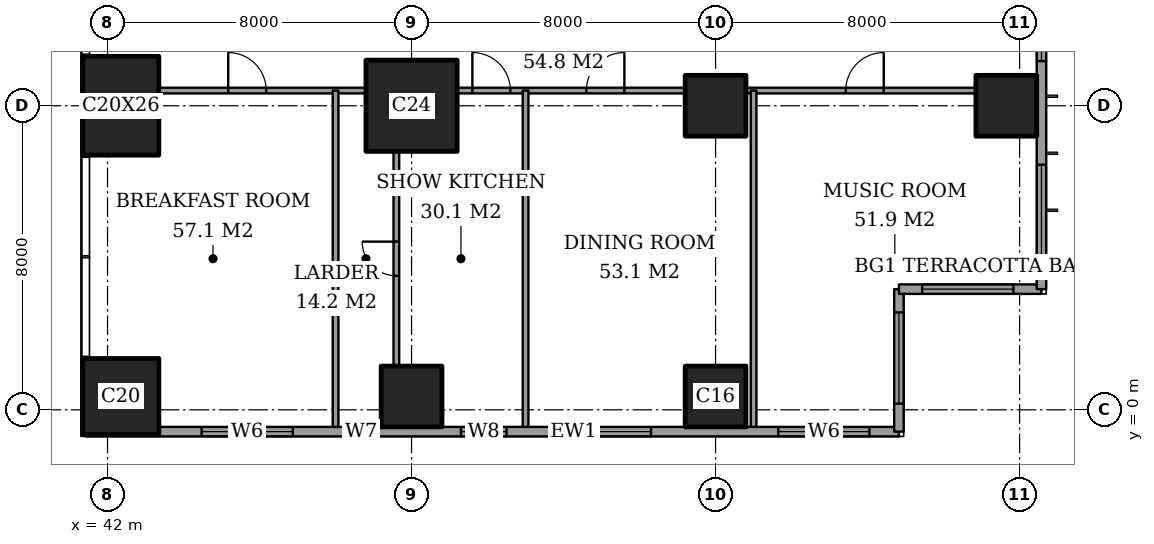
"""IFC4 building model, lengths in metres.
Left out: names, types, materials, properties, quantities, classifications, styles, units other than length and angle.
Written with IfcOpenShell. Run it as: python <this file> out.ifc"""

import sys

from ifc_helpers import new_model, si_unit, direction, frame, frame_2d, origin, origin_2d, place, context, subcontext, project, spatial, rectangle, extrude, element, fill, save


model = new_model("IFC4")
c1 = context("Model", 3, precision=1e-05, world=origin(), true_north=direction((0.0, 1.0)))
c2 = subcontext(c1, "Body", "Model", "MODEL_VIEW")
j1 = project(units=[si_unit("LENGTHUNIT", "METRE"), si_unit("PLANEANGLEUNIT", "RADIAN")], contexts=[c1])
p1 = place(None, origin())
s1 = spatial("IfcSite", under=j1, at=p1, CompositionType="ELEMENT")
p2 = place(p1, origin())
s2 = spatial("IfcBuilding", under=s1, at=p2, CompositionType="ELEMENT")
p3 = place(p2, frame((0.0, 0.0, 244.8)))
s3 = spatial("IfcBuildingStorey", under=s2, at=p3, CompositionType="ELEMENT", Elevation=244.8)
p4 = place(p3, frame((42.35, 0.35, 0.0), z_axis=(0.0, 0.0, 1.0), x_axis=(1.0, 0.0, 0.0)))
e1 = element("IfcColumn", 1, at=p4, inside=s3, PredefinedType="COLUMN", context=c2, shape_type="SweptSolid", body=[
    extrude(rectangle(XDim=2.0, YDim=2.0, at=origin_2d()), origin(), (0.0, 0.0, 1.0), 3.6),
])
p5 = place(p3, frame((42.35, 8.0, 0.0), z_axis=(0.0, 0.0, 1.0), x_axis=(1.0, 0.0, 0.0)))
e2 = element("IfcColumn", 2, at=p5, inside=s3, PredefinedType="COLUMN", context=c2, shape_type="SweptSolid", body=[
    extrude(rectangle(XDim=2.0, YDim=2.6, at=origin_2d()), origin(), (0.0, 0.0, 1.0), 3.6),
])
p6 = place(p3, frame((50.0, 0.35, 0.0), z_axis=(0.0, 0.0, 1.0), x_axis=(1.0, 0.0, 0.0)))
e3 = element("IfcColumn", 3, at=p6, inside=s3, PredefinedType="COLUMN", context=c2, shape_type="SweptSolid", body=[
    extrude(rectangle(XDim=1.6, YDim=1.6, at=origin_2d()), origin(), (0.0, 0.0, 1.0), 3.6),
])
p7 = place(p3, frame((50.0, 8.0, 0.0), z_axis=(0.0, 0.0, 1.0), x_axis=(1.0, 0.0, 0.0)))
e4 = element("IfcColumn", 4, at=p7, inside=s3, PredefinedType="COLUMN", context=c2, shape_type="SweptSolid", body=[
    extrude(rectangle(XDim=2.4, YDim=2.4, at=origin_2d()), origin(), (0.0, 0.0, 1.0), 3.6),
])
for number, where, z_axis, x_axis in (
    (5, (58.0, 0.35, 0.0), (0.0, 0.0, 1.0), (1.0, 0.0, 0.0)),
    (6, (58.0, 8.0, 0.0), (0.0, 0.0, 1.0), (1.0, 0.0, 0.0)),
    (7, (65.65, 8.0, 0.0), (0.0, 0.0, 1.0), (1.0, 0.0, 0.0)),
):
    element("IfcColumn", number, at=place(p3, frame(where, z_axis=z_axis, x_axis=x_axis)), inside=s3, PredefinedType="COLUMN", context=c2, shape_type="SweptSolid", body=[
        extrude(rectangle(XDim=1.6, YDim=1.6, at=origin_2d()), origin(), (0.0, 0.0, 1.0), 3.6),
    ])
p8 = place(p3, frame((41.425, -0.575, 0.0), z_axis=(0.0, 0.0, 1.0), x_axis=(1.0, 0.0, 0.0)))
e8 = element("IfcWall", 8, at=p8, inside=s3, PredefinedType="SOLIDWALL", context=c2, shape_type="SweptSolid", body=[
    extrude(rectangle(XDim=21.4, YDim=0.25, at=frame_2d((10.7, 0.0))), origin(), (0.0, 0.0, 1.0), 3.6),
])
p9 = place(p8, frame((3.05, 0.0, 0.6)))
e9 = element("IfcOpeningElement", 9, at=p9, cuts=e8, PredefinedType="OPENING", context=c2, shape_type="SweptSolid", body=[
    extrude(rectangle(XDim=2.4, YDim=2.0, at=frame_2d((1.2, 1.0))), frame((0.0, 0.135, 0.0), z_axis=(0.0, -1.0, 0.0), x_axis=(1.0, 0.0, 0.0)), (0.0, 0.0, 1.0), 0.27),
])
p10 = place(p8, frame((6.95, 0.0, 0.6)))
e10 = element("IfcOpeningElement", 10, at=p10, cuts=e8, PredefinedType="OPENING", context=c2, shape_type="SweptSolid", body=[
    extrude(rectangle(XDim=0.6, YDim=2.0, at=frame_2d((0.3, 1.0))), frame((0.0, 0.135, 0.0), z_axis=(0.0, -1.0, 0.0), x_axis=(1.0, 0.0, 0.0)), (0.0, 0.0, 1.0), 0.27),
])
p11 = place(p8, frame((9.875, 0.0, 0.6)))
e11 = element("IfcOpeningElement", 11, at=p11, cuts=e8, PredefinedType="OPENING", context=c2, shape_type="SweptSolid", body=[
    extrude(rectangle(XDim=1.2, YDim=2.0, at=frame_2d((0.6, 1.0))), frame((0.0, 0.135, 0.0), z_axis=(0.0, -1.0, 0.0), x_axis=(1.0, 0.0, 0.0)), (0.0, 0.0, 1.0), 0.27),
])
p12 = place(p8, frame((12.475, 0.0, 0.6)))
e12 = element("IfcOpeningElement", 12, at=p12, cuts=e8, PredefinedType="OPENING", context=c2, shape_type="SweptSolid", body=[
    extrude(rectangle(XDim=2.4, YDim=2.0, at=frame_2d((1.2, 1.0))), frame((0.0, 0.135, 0.0), z_axis=(0.0, -1.0, 0.0), x_axis=(1.0, 0.0, 0.0)), (0.0, 0.0, 1.0), 0.27),
])
p13 = place(p8, frame((18.225, 0.0, 0.6)))
e13 = element("IfcOpeningElement", 13, at=p13, cuts=e8, PredefinedType="OPENING", context=c2, shape_type="SweptSolid", body=[
    extrude(rectangle(XDim=2.4, YDim=2.0, at=frame_2d((1.2, 1.0))), frame((0.0, 0.135, 0.0), z_axis=(0.0, -1.0, 0.0), x_axis=(1.0, 0.0, 0.0)), (0.0, 0.0, 1.0), 0.27),
])
p14 = place(p3, frame((62.825, -0.575, 0.0), z_axis=(0.0, 0.0, 1.0), x_axis=(0.0, 1.0, 0.0)))
e14 = element("IfcWall", 14, at=p14, inside=s3, PredefinedType="SOLIDWALL", context=c2, shape_type="SweptSolid", body=[
    extrude(rectangle(XDim=3.75, YDim=0.25, at=frame_2d((1.875, 0.0))), origin(), (0.0, 0.0, 1.0), 3.6),
])
p15 = place(p14, frame((0.738, 0.0, 0.6)))
e15 = element("IfcOpeningElement", 15, at=p15, cuts=e14, PredefinedType="OPENING", context=c2, shape_type="SweptSolid", body=[
    extrude(rectangle(XDim=2.4, YDim=2.0, at=frame_2d((1.2, 1.0))), frame((0.0, 0.135, 0.0), z_axis=(0.0, -1.0, 0.0), x_axis=(1.0, 0.0, 0.0)), (0.0, 0.0, 1.0), 0.27),
])
p16 = place(p3, frame((62.825, 3.175, 0.0), z_axis=(0.0, 0.0, 1.0), x_axis=(1.0, 0.0, 0.0)))
e16 = element("IfcWall", 16, at=p16, inside=s3, PredefinedType="SOLIDWALL", context=c2, shape_type="SweptSolid", body=[
    extrude(rectangle(XDim=3.75, YDim=0.25, at=frame_2d((1.875, 0.0))), origin(), (0.0, 0.0, 1.0), 3.6),
])
p17 = place(p16, frame((0.613, 0.0, 0.6)))
e17 = element("IfcOpeningElement", 17, at=p17, cuts=e16, PredefinedType="OPENING", context=c2, shape_type="SweptSolid", body=[
    extrude(rectangle(XDim=2.4, YDim=2.0, at=frame_2d((1.2, 1.0))), frame((0.0, 0.135, 0.0), z_axis=(0.0, -1.0, 0.0), x_axis=(1.0, 0.0, 0.0)), (0.0, 0.0, 1.0), 0.27),
])
p18 = place(p3, frame((66.575, 3.175, 0.0), z_axis=(0.0, 0.0, 1.0), x_axis=(0.0, 1.0, 0.0)))
e18 = element("IfcWall", 18, at=p18, inside=s3, PredefinedType="SOLIDWALL", context=c2, shape_type="SweptSolid", body=[
    extrude(rectangle(XDim=41.65, YDim=0.25, at=frame_2d((20.825, 0.0))), origin(), (0.0, 0.0, 1.0), 3.6),
])
p19 = place(p18, frame((0.875, 0.0, 0.6)))
e19 = element("IfcOpeningElement", 19, at=p19, cuts=e18, PredefinedType="OPENING", context=c2, shape_type="SweptSolid", body=[
    extrude(rectangle(XDim=2.4, YDim=2.0, at=frame_2d((1.2, 1.0))), frame((0.0, 0.135, 0.0), z_axis=(0.0, -1.0, 0.0), x_axis=(1.0, 0.0, 0.0)), (0.0, 0.0, 1.0), 0.27),
])
p20 = place(p18, frame((6.0, 0.0, 0.6)))
e20 = element("IfcOpeningElement", 20, at=p20, cuts=e18, PredefinedType="OPENING", context=c2, shape_type="SweptSolid", body=[
    extrude(rectangle(XDim=1.2, YDim=2.0, at=frame_2d((0.6, 1.0))), frame((0.0, 0.135, 0.0), z_axis=(0.0, -1.0, 0.0), x_axis=(1.0, 0.0, 0.0)), (0.0, 0.0, 1.0), 0.27),
])
p21 = place(p18, frame((8.525, 0.0, 0.6)))
e21 = element("IfcOpeningElement", 21, at=p21, cuts=e18, PredefinedType="OPENING", context=c2, shape_type="SweptSolid", body=[
    extrude(rectangle(XDim=2.4, YDim=2.0, at=frame_2d((1.2, 1.0))), frame((0.0, 0.135, 0.0), z_axis=(0.0, -1.0, 0.0), x_axis=(1.0, 0.0, 0.0)), (0.0, 0.0, 1.0), 0.27),
])
p22 = place(p18, frame((15.725, 0.0, 0.6)))
e22 = element("IfcOpeningElement", 22, at=p22, cuts=e18, PredefinedType="OPENING", context=c2, shape_type="SweptSolid", body=[
    extrude(rectangle(XDim=2.4, YDim=2.0, at=frame_2d((1.2, 1.0))), frame((0.0, 0.135, 0.0), z_axis=(0.0, -1.0, 0.0), x_axis=(1.0, 0.0, 0.0)), (0.0, 0.0, 1.0), 0.27),
])
p23 = place(p18, frame((23.525, 0.0, 0.6)))
e23 = element("IfcOpeningElement", 23, at=p23, cuts=e18, PredefinedType="OPENING", context=c2, shape_type="SweptSolid", body=[
    extrude(rectangle(XDim=2.4, YDim=2.0, at=frame_2d((1.2, 1.0))), frame((0.0, 0.135, 0.0), z_axis=(0.0, -1.0, 0.0), x_axis=(1.0, 0.0, 0.0)), (0.0, 0.0, 1.0), 0.27),
])
p24 = place(p18, frame((30.625, 0.0, 0.6)))
e24 = element("IfcOpeningElement", 24, at=p24, cuts=e18, PredefinedType="OPENING", context=c2, shape_type="SweptSolid", body=[
    extrude(rectangle(XDim=2.4, YDim=2.0, at=frame_2d((1.2, 1.0))), frame((0.0, 0.135, 0.0), z_axis=(0.0, -1.0, 0.0), x_axis=(1.0, 0.0, 0.0)), (0.0, 0.0, 1.0), 0.27),
])
p25 = place(p18, frame((34.325, 0.0, 0.6)))
e25 = element("IfcOpeningElement", 25, at=p25, cuts=e18, PredefinedType="OPENING", context=c2, shape_type="SweptSolid", body=[
    extrude(rectangle(XDim=1.2, YDim=2.0, at=frame_2d((0.6, 1.0))), frame((0.0, 0.135, 0.0), z_axis=(0.0, -1.0, 0.0), x_axis=(1.0, 0.0, 0.0)), (0.0, 0.0, 1.0), 0.27),
])
p26 = place(p18, frame((38.375, 0.0, 0.6)))
e26 = element("IfcOpeningElement", 26, at=p26, cuts=e18, PredefinedType="OPENING", context=c2, shape_type="SweptSolid", body=[
    extrude(rectangle(XDim=2.4, YDim=2.0, at=frame_2d((1.2, 1.0))), frame((0.0, 0.135, 0.0), z_axis=(0.0, -1.0, 0.0), x_axis=(1.0, 0.0, 0.0)), (0.0, 0.0, 1.0), 0.27),
])
p27 = place(p3, frame((43.35, 8.4, 0.0), z_axis=(0.0, 0.0, 1.0), x_axis=(1.0, 0.0, 0.0)))
e27 = element("IfcWall", 27, at=p27, inside=s3, PredefinedType="PARTITIONING", context=c2, shape_type="SweptSolid", body=[
    extrude(rectangle(XDim=5.45, YDim=0.15, at=frame_2d((2.725, 0.0))), origin(), (0.0, 0.0, 1.0), 3.35),
])
p28 = place(p27, frame((1.825, 0.0, 0.0)))
e28 = element("IfcOpeningElement", 28, at=p28, cuts=e27, PredefinedType="OPENING", context=c2, shape_type="SweptSolid", body=[
    extrude(rectangle(XDim=1.0, YDim=2.1, at=frame_2d((0.5, 1.05))), frame((0.0, 0.085, 0.0), z_axis=(0.0, -1.0, 0.0), x_axis=(1.0, 0.0, 0.0)), (0.0, 0.0, 1.0), 0.17),
])
p29 = place(p3, frame((51.2, 8.4, 0.0), z_axis=(0.0, 0.0, 1.0), x_axis=(1.0, 0.0, 0.0)))
e29 = element("IfcWall", 29, at=p29, inside=s3, PredefinedType="PARTITIONING", context=c2, shape_type="SweptSolid", body=[
    extrude(rectangle(XDim=6.0, YDim=0.15, at=frame_2d((3.0, 0.0))), origin(), (0.0, 0.0, 1.0), 3.35),
])
p30 = place(p29, frame((3.4, 0.0, 0.0)))
e30 = element("IfcOpeningElement", 30, at=p30, cuts=e29, PredefinedType="OPENING", context=c2, shape_type="SweptSolid", body=[
    extrude(rectangle(XDim=1.0, YDim=2.1, at=frame_2d((0.5, 1.05))), frame((0.0, 0.085, 0.0), z_axis=(0.0, -1.0, 0.0), x_axis=(1.0, 0.0, 0.0)), (0.0, 0.0, 1.0), 0.17),
])
p31 = place(p29, frame((0.4, 0.0, 0.0)))
e31 = element("IfcOpeningElement", 31, at=p31, cuts=e29, PredefinedType="OPENING", context=c2, shape_type="SweptSolid", body=[
    extrude(rectangle(XDim=1.0, YDim=2.1, at=frame_2d((0.5, 1.05))), frame((0.0, 0.085, 0.0), z_axis=(0.0, -1.0, 0.0), x_axis=(1.0, 0.0, 0.0)), (0.0, 0.0, 1.0), 0.17),
])
p32 = place(p3, frame((58.8, 8.4, 0.0), z_axis=(0.0, 0.0, 1.0), x_axis=(1.0, 0.0, 0.0)))
e32 = element("IfcWall", 32, at=p32, inside=s3, PredefinedType="PARTITIONING", context=c2, shape_type="SweptSolid", body=[
    extrude(rectangle(XDim=6.05, YDim=0.15, at=frame_2d((3.025, 0.0))), origin(), (0.0, 0.0, 1.0), 3.35),
])
p33 = place(p32, frame((2.625, 0.0, 0.0)))
e33 = element("IfcOpeningElement", 33, at=p33, cuts=e32, PredefinedType="OPENING", context=c2, shape_type="SweptSolid", body=[
    extrude(rectangle(XDim=1.0, YDim=2.1, at=frame_2d((0.5, 1.05))), frame((0.0, 0.085, 0.0), z_axis=(0.0, -1.0, 0.0), x_axis=(1.0, 0.0, 0.0)), (0.0, 0.0, 1.0), 0.17),
])
p34 = place(p3, frame((48.0, -0.45, 0.0), z_axis=(0.0, 0.0, 1.0), x_axis=(0.0, 1.0, 0.0)))
e34 = element("IfcWall", 34, at=p34, inside=s3, PredefinedType="PARTITIONING", context=c2, shape_type="SweptSolid", body=[
    extrude(rectangle(XDim=8.85, YDim=0.15, at=frame_2d((4.425, 0.0))), origin(), (0.0, 0.0, 1.0), 3.35),
])
p35 = place(p3, frame((49.6, 1.15, 0.0), z_axis=(0.0, 0.0, 1.0), x_axis=(0.0, 1.0, 0.0)))
e35 = element("IfcWall", 35, at=p35, inside=s3, PredefinedType="PARTITIONING", context=c2, shape_type="SweptSolid", body=[
    extrude(rectangle(XDim=5.65, YDim=0.15, at=frame_2d((2.825, 0.0))), origin(), (0.0, 0.0, 1.0), 3.35),
])
p36 = place(p35, frame((2.375, 0.0, 0.0)))
e36 = element("IfcOpeningElement", 36, at=p36, cuts=e35, PredefinedType="OPENING", context=c2, shape_type="SweptSolid", body=[
    extrude(rectangle(XDim=0.9, YDim=2.1, at=frame_2d((0.45, 1.05))), frame((0.0, 0.085, 0.0), z_axis=(0.0, -1.0, 0.0), x_axis=(1.0, 0.0, 0.0)), (0.0, 0.0, 1.0), 0.17),
])
for number, where, z_axis, x_axis in (
    (37, (53.0, -0.45, 0.0), (0.0, 0.0, 1.0), (0.0, 1.0, 0.0)),
    (38, (59.0, -0.45, 0.0), (0.0, 0.0, 1.0), (0.0, 1.0, 0.0)),
):
    element("IfcWall", number, at=place(p3, frame(where, z_axis=z_axis, x_axis=x_axis)), inside=s3, PredefinedType="PARTITIONING", context=c2, shape_type="SweptSolid", body=[
        extrude(rectangle(XDim=8.85, YDim=0.15, at=frame_2d((4.425, 0.0))), origin(), (0.0, 0.0, 1.0), 3.35),
    ])
p37 = place(p9, origin())
e39 = element("IfcWindow", 39, at=p37, inside=s3, PartitioningType="SINGLE_PANEL", PredefinedType="WINDOW", context=c2, shape_type="SweptSolid", body=[
    extrude(rectangle(XDim=2.4, YDim=2.0, at=frame_2d((1.2, 1.0))), frame((0.0, 0.03, 0.0), z_axis=(0.0, -1.0, 0.0), x_axis=(1.0, 0.0, 0.0)), (0.0, 0.0, 1.0), 0.06),
])
fill(e9, e39)
p38 = place(p10, origin())
e40 = element("IfcWindow", 40, at=p38, inside=s3, PartitioningType="SINGLE_PANEL", PredefinedType="WINDOW", context=c2, shape_type="SweptSolid", body=[
    extrude(rectangle(XDim=0.6, YDim=2.0, at=frame_2d((0.3, 1.0))), frame((0.0, 0.03, 0.0), z_axis=(0.0, -1.0, 0.0), x_axis=(1.0, 0.0, 0.0)), (0.0, 0.0, 1.0), 0.06),
])
fill(e10, e40)
p39 = place(p11, origin())
e41 = element("IfcWindow", 41, at=p39, inside=s3, PartitioningType="SINGLE_PANEL", PredefinedType="WINDOW", context=c2, shape_type="SweptSolid", body=[
    extrude(rectangle(XDim=1.2, YDim=2.0, at=frame_2d((0.6, 1.0))), frame((0.0, 0.03, 0.0), z_axis=(0.0, -1.0, 0.0), x_axis=(1.0, 0.0, 0.0)), (0.0, 0.0, 1.0), 0.06),
])
fill(e11, e41)
p40 = place(p12, origin())
e42 = element("IfcWindow", 42, at=p40, inside=s3, PartitioningType="SINGLE_PANEL", PredefinedType="WINDOW", context=c2, shape_type="SweptSolid", body=[
    extrude(rectangle(XDim=2.4, YDim=2.0, at=frame_2d((1.2, 1.0))), frame((0.0, 0.03, 0.0), z_axis=(0.0, -1.0, 0.0), x_axis=(1.0, 0.0, 0.0)), (0.0, 0.0, 1.0), 0.06),
])
fill(e12, e42)
p41 = place(p13, origin())
e43 = element("IfcWindow", 43, at=p41, inside=s3, PartitioningType="SINGLE_PANEL", PredefinedType="WINDOW", context=c2, shape_type="SweptSolid", body=[
    extrude(rectangle(XDim=2.4, YDim=2.0, at=frame_2d((1.2, 1.0))), frame((0.0, 0.03, 0.0), z_axis=(0.0, -1.0, 0.0), x_axis=(1.0, 0.0, 0.0)), (0.0, 0.0, 1.0), 0.06),
])
fill(e13, e43)
p42 = place(p15, origin())
e44 = element("IfcWindow", 44, at=p42, inside=s3, PartitioningType="SINGLE_PANEL", PredefinedType="WINDOW", context=c2, shape_type="SweptSolid", body=[
    extrude(rectangle(XDim=2.4, YDim=2.0, at=frame_2d((1.2, 1.0))), frame((0.0, 0.03, 0.0), z_axis=(0.0, -1.0, 0.0), x_axis=(1.0, 0.0, 0.0)), (0.0, 0.0, 1.0), 0.06),
])
fill(e15, e44)
p43 = place(p17, origin())
e45 = element("IfcWindow", 45, at=p43, inside=s3, PartitioningType="SINGLE_PANEL", PredefinedType="WINDOW", context=c2, shape_type="SweptSolid", body=[
    extrude(rectangle(XDim=2.4, YDim=2.0, at=frame_2d((1.2, 1.0))), frame((0.0, 0.03, 0.0), z_axis=(0.0, -1.0, 0.0), x_axis=(1.0, 0.0, 0.0)), (0.0, 0.0, 1.0), 0.06),
])
fill(e17, e45)
p44 = place(p19, origin())
e46 = element("IfcWindow", 46, at=p44, inside=s3, PartitioningType="SINGLE_PANEL", PredefinedType="WINDOW", context=c2, shape_type="SweptSolid", body=[
    extrude(rectangle(XDim=2.4, YDim=2.0, at=frame_2d((1.2, 1.0))), frame((0.0, 0.03, 0.0), z_axis=(0.0, -1.0, 0.0), x_axis=(1.0, 0.0, 0.0)), (0.0, 0.0, 1.0), 0.06),
])
fill(e19, e46)
p45 = place(p20, origin())
e47 = element("IfcWindow", 47, at=p45, inside=s3, PartitioningType="SINGLE_PANEL", PredefinedType="WINDOW", context=c2, shape_type="SweptSolid", body=[
    extrude(rectangle(XDim=1.2, YDim=2.0, at=frame_2d((0.6, 1.0))), frame((0.0, 0.03, 0.0), z_axis=(0.0, -1.0, 0.0), x_axis=(1.0, 0.0, 0.0)), (0.0, 0.0, 1.0), 0.06),
])
fill(e20, e47)
p46 = place(p33, origin())
e48 = element("IfcDoor", 48, at=p46, inside=s3, OperationType="SINGLE_SWING_LEFT", PredefinedType="DOOR", context=c2, shape_type="SweptSolid", body=[
    extrude(rectangle(XDim=1.0, YDim=2.1, at=frame_2d((0.5, 1.05))), frame((0.0, 0.025, 0.0), z_axis=(0.0, -1.0, 0.0), x_axis=(1.0, 0.0, 0.0)), (0.0, 0.0, 1.0), 0.05),
])
fill(e33, e48)
p47 = place(p30, origin())
e49 = element("IfcDoor", 49, at=p47, inside=s3, OperationType="SINGLE_SWING_LEFT", PredefinedType="DOOR", context=c2, shape_type="SweptSolid", body=[
    extrude(rectangle(XDim=1.0, YDim=2.1, at=frame_2d((0.5, 1.05))), frame((0.0, 0.025, 0.0), z_axis=(0.0, -1.0, 0.0), x_axis=(1.0, 0.0, 0.0)), (0.0, 0.0, 1.0), 0.05),
])
fill(e30, e49)
p48 = place(p31, origin())
e50 = element("IfcDoor", 50, at=p48, inside=s3, OperationType="SINGLE_SWING_RIGHT", PredefinedType="DOOR", context=c2, shape_type="SweptSolid", body=[
    extrude(rectangle(XDim=1.0, YDim=2.1, at=frame_2d((0.5, 1.05))), frame((0.0, 0.025, 0.0), z_axis=(0.0, -1.0, 0.0), x_axis=(1.0, 0.0, 0.0)), (0.0, 0.0, 1.0), 0.05),
])
fill(e31, e50)
p49 = place(p36, origin())
e51 = element("IfcDoor", 51, at=p49, inside=s3, OperationType="SINGLE_SWING_LEFT", PredefinedType="DOOR", context=c2, shape_type="SweptSolid", body=[
    extrude(rectangle(XDim=0.9, YDim=2.1, at=frame_2d((0.45, 1.05))), frame((0.0, 0.025, 0.0), z_axis=(0.0, -1.0, 0.0), x_axis=(1.0, 0.0, 0.0)), (0.0, 0.0, 1.0), 0.05),
])
fill(e36, e51)
p50 = place(p28, origin())
e52 = element("IfcDoor", 52, at=p50, inside=s3, OperationType="SINGLE_SWING_RIGHT", PredefinedType="DOOR", context=c2, shape_type="SweptSolid", body=[
    extrude(rectangle(XDim=1.0, YDim=2.1, at=frame_2d((0.5, 1.05))), frame((0.0, 0.025, 0.0), z_axis=(0.0, -1.0, 0.0), x_axis=(1.0, 0.0, 0.0)), (0.0, 0.0, 1.0), 0.05),
])
fill(e28, e52)
save(model, sys.argv[1])
